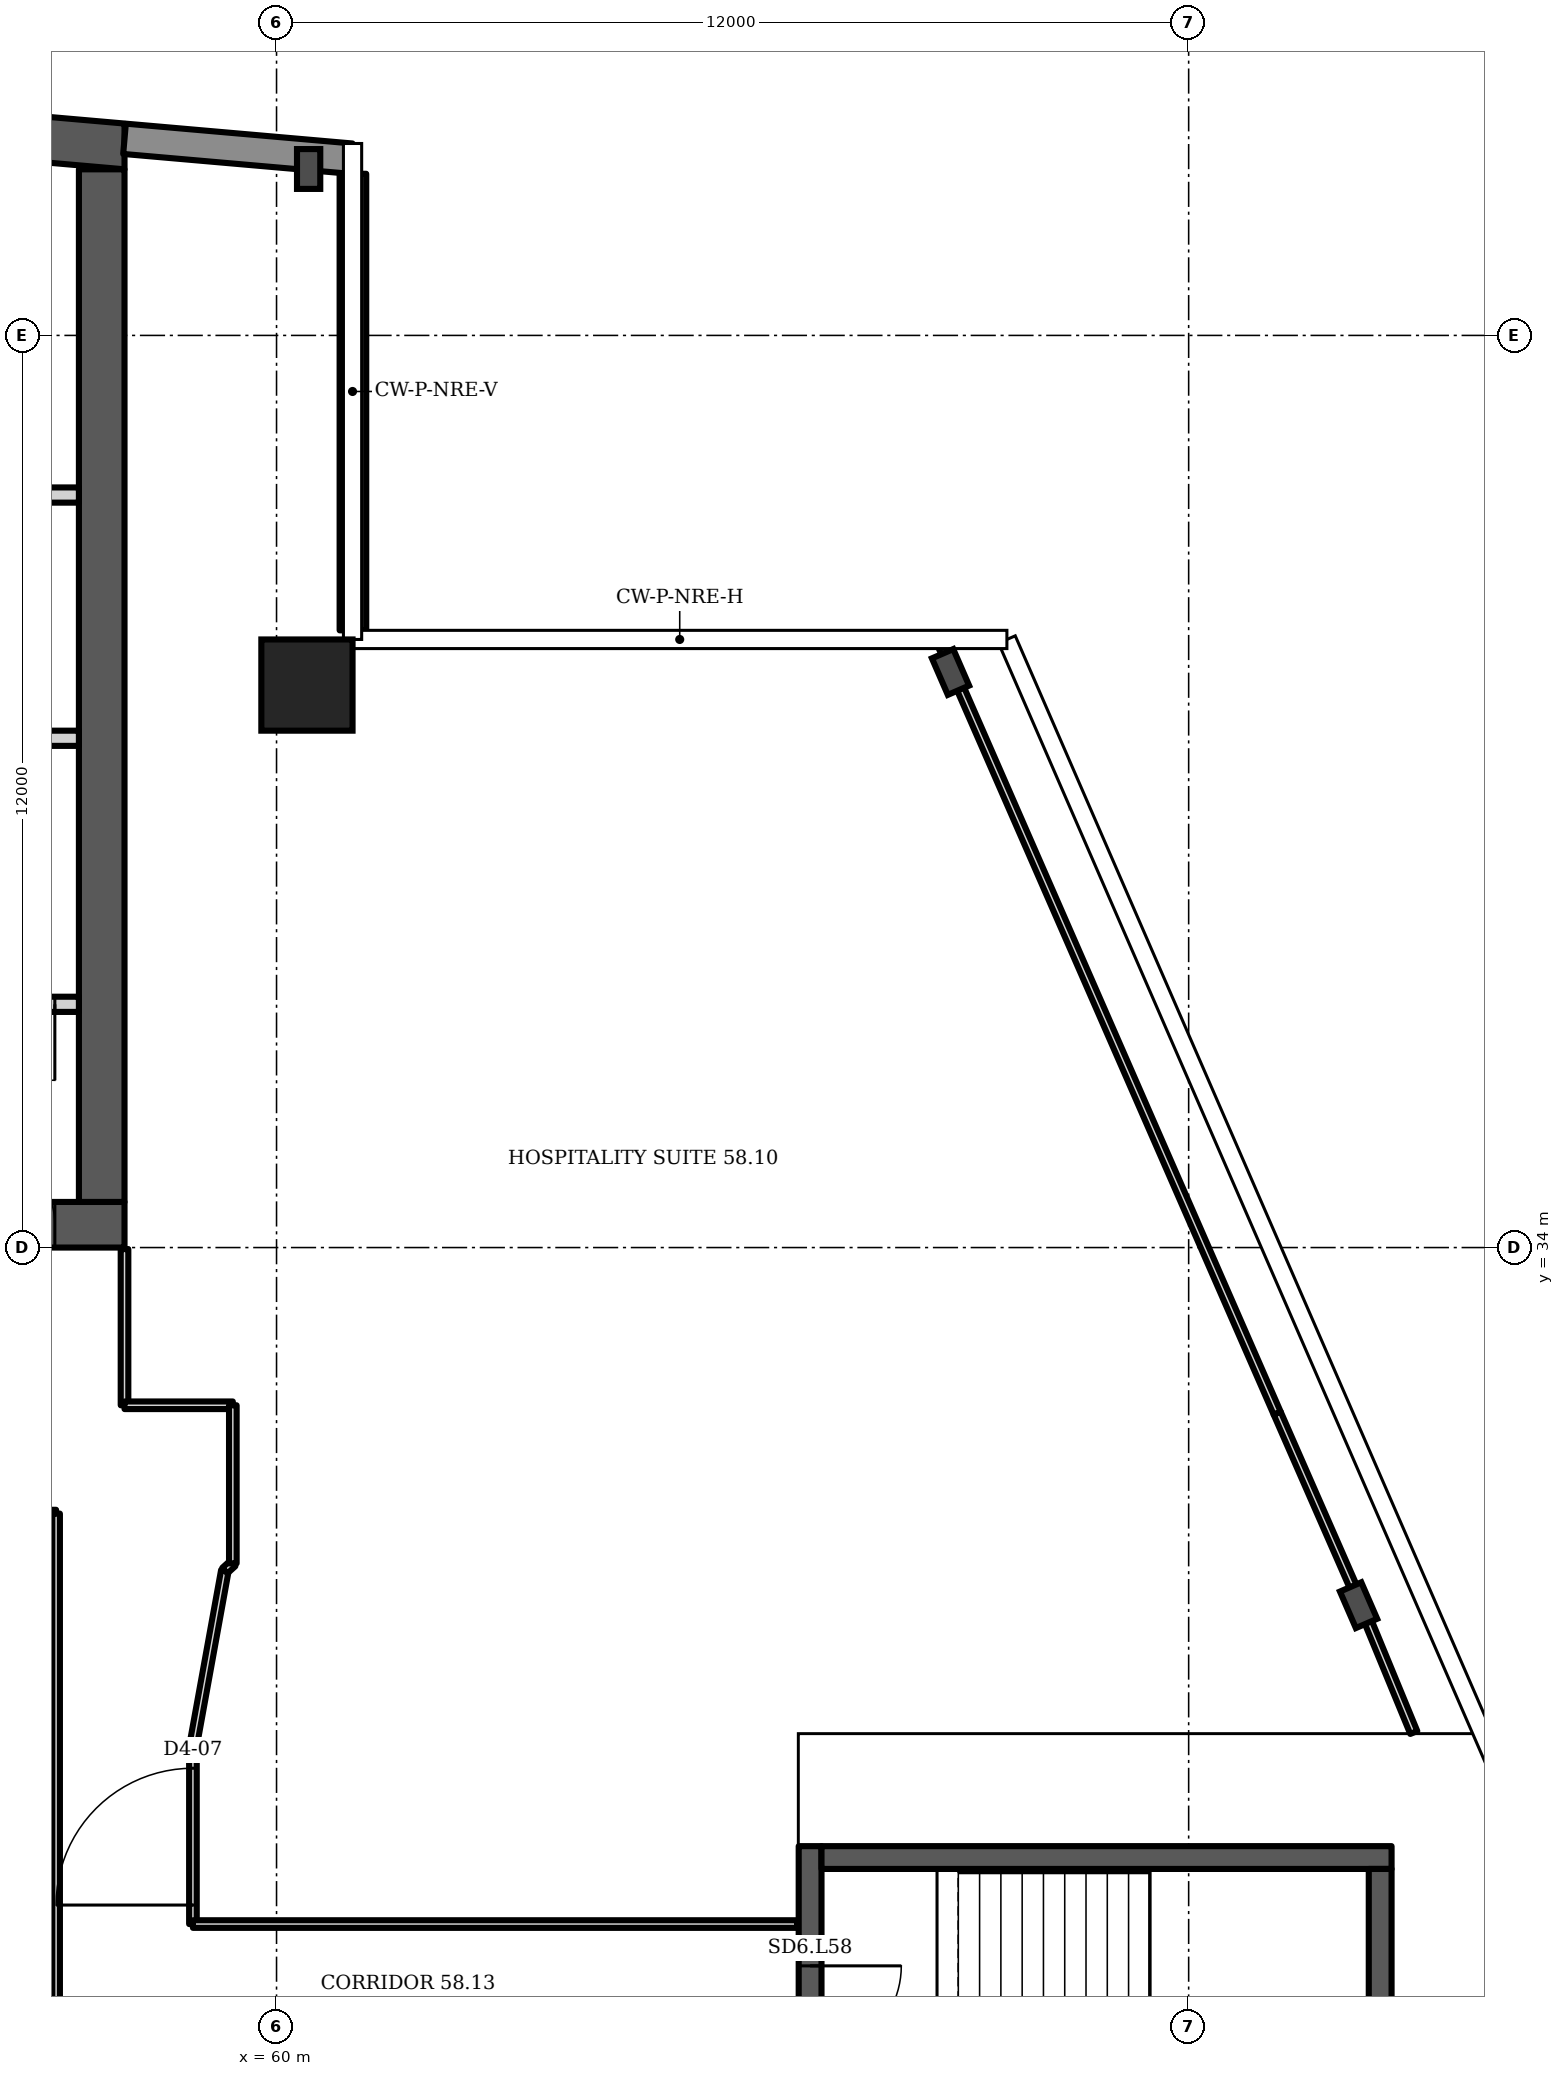
"""IFC4 building model, lengths in metres.
Left out: names, types, materials, properties, quantities, classifications, styles, units other than length and angle.
Written with IfcOpenShell. Run it as: python <this file> out.ifc"""

import sys

from ifc_helpers import new_model, si_unit, direction, frame, frame_2d, origin, origin_2d, place, context, subcontext, project, spatial, polyline, rectangle, i_section, outline, extrude, element, fill, save


model = new_model("IFC4")
c1 = context("Model", 3, precision=1e-05, world=origin(), true_north=direction((0.0, 1.0)))
c2 = subcontext(c1, "Body", "Model", "MODEL_VIEW")
j1 = project(units=[si_unit("LENGTHUNIT", "METRE"), si_unit("PLANEANGLEUNIT", "RADIAN")], contexts=[c1])
p1 = place(None, origin())
s1 = spatial("IfcSite", under=j1, at=p1, CompositionType="ELEMENT")
p2 = place(p1, origin())
s2 = spatial("IfcBuilding", under=s1, at=p2, CompositionType="ELEMENT")
p3 = place(p2, frame((0.0, 0.0, 232.3)))
s3 = spatial("IfcBuildingStorey", under=s2, at=p3, CompositionType="ELEMENT", Elevation=232.3)
p4 = place(p3, frame((0.0, 0.0, -0.0)))
e1 = element("IfcWall", 1, at=p4, inside=s3, PredefinedType="SHEAR", context=c2, shape_type="SweptSolid", body=[
    extrude(outline(polyline([(23.0, 48.185), (40.5, 49.716), (58.0, 48.185), (58.0, 48.787), (40.5, 50.318), (23.0, 48.787), (23.0, 48.185)])), origin(), (0.0, 0.0, 1.0), 3.6),
])
p5 = place(p3, frame((23.0, 34.3, 0.0), z_axis=(0.0, 0.0, 1.0), x_axis=(1.0, 0.0, 0.0)))
e2 = element("IfcWall", 2, at=p5, inside=s3, PredefinedType="SHEAR", context=c2, shape_type="SweptSolid", body=[
    extrude(rectangle(XDim=35.0, YDim=0.6, at=frame_2d((17.5, 0.0))), origin(), (0.0, 0.0, 1.0), 3.6),
])
p6 = place(p5, frame((0.65, 0.0, 0.0)))
e3 = element("IfcOpeningElement", 3, at=p6, cuts=e2, PredefinedType="OPENING", context=c2, shape_type="SweptSolid", body=[
    extrude(rectangle(XDim=1.2, YDim=2.1, at=frame_2d((0.6, 1.05))), frame((0.0, 0.31, 0.0), z_axis=(0.0, -1.0, 0.0), x_axis=(1.0, 0.0, 0.0)), (0.0, 0.0, 1.0), 0.62),
])
p7 = place(p5, frame((7.717, 0.0, 0.0)))
e4 = element("IfcOpeningElement", 4, at=p7, cuts=e2, PredefinedType="OPENING", context=c2, shape_type="SweptSolid", body=[
    extrude(rectangle(XDim=1.1, YDim=2.1, at=frame_2d((0.55, 1.05))), frame((0.0, 0.31, 0.0), z_axis=(0.0, -1.0, 0.0), x_axis=(1.0, 0.0, 0.0)), (0.0, 0.0, 1.0), 0.62),
])
p8 = place(p5, frame((12.183, 0.0, 0.0)))
e5 = element("IfcOpeningElement", 5, at=p8, cuts=e2, PredefinedType="OPENING", context=c2, shape_type="SweptSolid", body=[
    extrude(rectangle(XDim=1.1, YDim=2.1, at=frame_2d((0.55, 1.05))), frame((0.0, 0.31, 0.0), z_axis=(0.0, -1.0, 0.0), x_axis=(1.0, 0.0, 0.0)), (0.0, 0.0, 1.0), 0.62),
])
p9 = place(p5, frame((9.8, 0.0, 0.0)))
e6 = element("IfcOpeningElement", 6, at=p9, cuts=e2, PredefinedType="OPENING", context=c2, shape_type="SweptSolid", body=[
    extrude(rectangle(XDim=1.4, YDim=2.1, at=frame_2d((0.7, 1.05))), frame((0.0, 0.31, 0.0), z_axis=(0.0, -1.0, 0.0), x_axis=(1.0, 0.0, 0.0)), (0.0, 0.0, 1.0), 0.62),
])
p10 = place(p5, frame((14.717, 0.0, 0.0)))
e7 = element("IfcOpeningElement", 7, at=p10, cuts=e2, PredefinedType="OPENING", context=c2, shape_type="SweptSolid", body=[
    extrude(rectangle(XDim=1.1, YDim=2.1, at=frame_2d((0.55, 1.05))), frame((0.0, 0.31, 0.0), z_axis=(0.0, -1.0, 0.0), x_axis=(1.0, 0.0, 0.0)), (0.0, 0.0, 1.0), 0.62),
])
p11 = place(p5, frame((16.95, 0.0, 0.0)))
e8 = element("IfcOpeningElement", 8, at=p11, cuts=e2, PredefinedType="OPENING", context=c2, shape_type="SweptSolid", body=[
    extrude(rectangle(XDim=1.1, YDim=2.1, at=frame_2d((0.55, 1.05))), frame((0.0, 0.31, 0.0), z_axis=(0.0, -1.0, 0.0), x_axis=(1.0, 0.0, 0.0)), (0.0, 0.0, 1.0), 0.62),
])
p12 = place(p5, frame((19.183, 0.0, 0.0)))
e9 = element("IfcOpeningElement", 9, at=p12, cuts=e2, PredefinedType="OPENING", context=c2, shape_type="SweptSolid", body=[
    extrude(rectangle(XDim=1.1, YDim=2.1, at=frame_2d((0.55, 1.05))), frame((0.0, 0.31, 0.0), z_axis=(0.0, -1.0, 0.0), x_axis=(1.0, 0.0, 0.0)), (0.0, 0.0, 1.0), 0.62),
])
p13 = place(p5, frame((26.15, 0.0, 0.0)))
e10 = element("IfcOpeningElement", 10, at=p13, cuts=e2, PredefinedType="OPENING", context=c2, shape_type="SweptSolid", body=[
    extrude(rectangle(XDim=1.2, YDim=2.1, at=frame_2d((0.6, 1.05))), frame((0.0, 0.31, 0.0), z_axis=(0.0, -1.0, 0.0), x_axis=(1.0, 0.0, 0.0)), (0.0, 0.0, 1.0), 0.62),
])
p14 = place(p5, frame((28.767, 0.0, 0.0)))
e11 = element("IfcOpeningElement", 11, at=p14, cuts=e2, PredefinedType="OPENING", context=c2, shape_type="SweptSolid", body=[
    extrude(rectangle(XDim=1.0, YDim=2.1, at=frame_2d((0.5, 1.05))), frame((0.0, 0.31, 0.0), z_axis=(0.0, -1.0, 0.0), x_axis=(1.0, 0.0, 0.0)), (0.0, 0.0, 1.0), 0.62),
])
p15 = place(p5, frame((33.083, 0.0, 0.0)))
e12 = element("IfcOpeningElement", 12, at=p15, cuts=e2, PredefinedType="OPENING", context=c2, shape_type="SweptSolid", body=[
    extrude(rectangle(XDim=1.0, YDim=2.1, at=frame_2d((0.5, 1.05))), frame((0.0, 0.31, 0.0), z_axis=(0.0, -1.0, 0.0), x_axis=(1.0, 0.0, 0.0)), (0.0, 0.0, 1.0), 0.62),
])
p16 = place(p5, frame((30.8, 0.0, 0.0)))
e13 = element("IfcOpeningElement", 13, at=p16, cuts=e2, PredefinedType="OPENING", context=c2, shape_type="SweptSolid", body=[
    extrude(rectangle(XDim=1.4, YDim=2.1, at=frame_2d((0.7, 1.05))), frame((0.0, 0.31, 0.0), z_axis=(0.0, -1.0, 0.0), x_axis=(1.0, 0.0, 0.0)), (0.0, 0.0, 1.0), 0.62),
])
p17 = place(p3, frame((57.7, 34.6, 0.0), z_axis=(0.0, 0.0, 1.0), x_axis=(0.0, 1.0, 0.0)))
e14 = element("IfcWall", 14, at=p17, inside=s3, PredefinedType="SHEAR", context=c2, shape_type="SweptSolid", body=[
    extrude(rectangle(XDim=13.585, YDim=0.6, at=frame_2d((6.792, 0.0))), origin(), (0.0, 0.0, 1.0), 3.6),
])
p18 = place(p3, frame((60.4, 41.4, 0.0), z_axis=(0.0, 0.0, 1.0), x_axis=(1.0, 0.0, 0.0)))
e15 = element("IfcColumn", 15, at=p18, inside=s3, PredefinedType="COLUMN", context=c2, shape_type="SweptSolid", body=[
    extrude(rectangle(XDim=1.2, YDim=1.2, at=origin_2d()), origin(), (0.0, 0.0, 1.0), 3.6),
])
for number, where, z_axis, x_axis in (
    (16, (74.235, 29.295, 0.0), (0.0, 0.0, 1.0), (0.917, 0.399, 0.0)),
    (17, (68.867, 41.572, 0.0), (0.0, 0.0, 1.0), (0.917, 0.399, 0.0)),
    (18, (60.422, 48.189, 0.0), (0.0, 0.0, 1.0), (1.0, 0.0, 0.0)),
):
    element("IfcColumn", number, at=place(p3, frame(where, z_axis=z_axis, x_axis=x_axis)), inside=s3, PredefinedType="COLUMN", context=c2, shape_type="SweptSolid", body=[
        extrude(i_section(OverallWidth=0.306, OverallDepth=0.524, WebThickness=0.021, FlangeThickness=0.04, FilletRadius=0.027, at=origin_2d()), origin(), (0.0, 0.0, 1.0), 3.6),
    ])
p19 = place(p3, frame((60.983, 48.326, 0.0), z_axis=(0.0, 0.0, 1.0), x_axis=(-0.996194, 0.087168, 0.0)))
e19 = element("IfcWall", 19, at=p19, inside=s3, PredefinedType="SOLIDWALL", context=c2, shape_type="SweptSolid", body=[
    extrude(rectangle(XDim=2.994, YDim=0.4, at=frame_2d((1.497, 0.0))), origin(), (0.0, 0.0, 1.0), 3.2),
])
p20 = place(p3, frame((61.005, 42.12, 0.0), z_axis=(0.0, 0.0, 1.0), x_axis=(0.0, 1.0, 0.0)))
e20 = element("IfcWall", 20, at=p20, inside=s3, PredefinedType="SOLIDWALL", context=c2, shape_type="SweptSolid", body=[
    extrude(rectangle(XDim=6.006, YDim=0.35, at=frame_2d((3.003, 0.0))), origin(), (0.0, 0.0, 1.0), 1.0),
])
p21 = place(p3, frame((55.767, 37.2, 0.0), z_axis=(0.0, 0.0, 1.0), x_axis=(1.0, 0.0, 0.0)))
e21 = element("IfcWall", 21, at=p21, inside=s3, PredefinedType="PARTITIONING", context=c2, shape_type="SweptSolid", body=[
    extrude(rectangle(XDim=1.633, YDim=0.2, at=frame_2d((0.817, 0.0))), origin(), (0.0, 0.0, 1.0), 3.2),
])
p22 = place(p21, frame((0.317, 0.0, 0.0)))
e22 = element("IfcOpeningElement", 22, at=p22, cuts=e21, PredefinedType="OPENING", context=c2, shape_type="SweptSolid", body=[
    extrude(rectangle(XDim=1.0, YDim=2.1, at=frame_2d((0.5, 1.05))), frame((0.0, 0.11, 0.0), z_axis=(0.0, -1.0, 0.0), x_axis=(1.0, 0.0, 0.0)), (0.0, 0.0, 1.0), 0.22),
])
p23 = place(p3, frame((51.3, 40.7, 0.0), z_axis=(0.0, 0.0, 1.0), x_axis=(1.0, 0.0, 0.0)))
e23 = element("IfcWall", 23, at=p23, inside=s3, PredefinedType="PARTITIONING", context=c2, shape_type="SweptSolid", body=[
    extrude(rectangle(XDim=6.1, YDim=0.2, at=frame_2d((3.05, 0.0))), origin(), (0.0, 0.0, 1.0), 3.2),
])
p24 = place(p23, frame((0.417, 0.0, 0.0)))
e24 = element("IfcOpeningElement", 24, at=p24, cuts=e23, PredefinedType="OPENING", context=c2, shape_type="SweptSolid", body=[
    extrude(rectangle(XDim=1.1, YDim=2.1, at=frame_2d((0.55, 1.05))), frame((0.0, 0.11, 0.0), z_axis=(0.0, -1.0, 0.0), x_axis=(1.0, 0.0, 0.0)), (0.0, 0.0, 1.0), 0.22),
])
p25 = place(p23, frame((3.617, 0.0, 0.0)))
e25 = element("IfcOpeningElement", 25, at=p25, cuts=e23, PredefinedType="OPENING", context=c2, shape_type="SweptSolid", body=[
    extrude(rectangle(XDim=1.0, YDim=2.1, at=frame_2d((0.5, 1.05))), frame((0.0, 0.11, 0.0), z_axis=(0.0, -1.0, 0.0), x_axis=(1.0, 0.0, 0.0)), (0.0, 0.0, 1.0), 0.22),
])
p26 = place(p3, frame((51.3, 43.9, 0.0), z_axis=(0.0, 0.0, 1.0), x_axis=(1.0, 0.0, 0.0)))
e26 = element("IfcWall", 26, at=p26, inside=s3, PredefinedType="PARTITIONING", context=c2, shape_type="SweptSolid", body=[
    extrude(rectangle(XDim=6.1, YDim=0.2, at=frame_2d((3.05, 0.0))), origin(), (0.0, 0.0, 1.0), 3.2),
])
p27 = place(p26, frame((3.617, 0.0, 0.0)))
e27 = element("IfcOpeningElement", 27, at=p27, cuts=e26, PredefinedType="OPENING", context=c2, shape_type="SweptSolid", body=[
    extrude(rectangle(XDim=1.0, YDim=2.1, at=frame_2d((0.5, 1.05))), frame((0.0, 0.11, 0.0), z_axis=(0.0, -1.0, 0.0), x_axis=(1.0, 0.0, 0.0)), (0.0, 0.0, 1.0), 0.22),
])
p28 = place(p3, frame((67.02, 21.775, 0.0), z_axis=(0.0, 0.0, 1.0), x_axis=(0.0, 1.0, 0.0)))
e28 = element("IfcWall", 28, at=p28, inside=s3, PredefinedType="SHEAR", context=c2, shape_type="SweptSolid", body=[
    extrude(rectangle(XDim=4.35, YDim=0.3, at=frame_2d((2.175, 0.0))), origin(), (0.0, 0.0, 1.0), 3.2),
])
p29 = place(p28, frame((1.575, 0.0, 0.0)))
e29 = element("IfcOpeningElement", 29, at=p29, cuts=e28, PredefinedType="OPENING", context=c2, shape_type="SweptSolid", body=[
    extrude(rectangle(XDim=1.2, YDim=2.1, at=frame_2d((0.6, 1.05))), frame((0.0, 0.16, 0.0), z_axis=(0.0, -1.0, 0.0), x_axis=(1.0, 0.0, 0.0)), (0.0, 0.0, 1.0), 0.32),
])
p30 = place(p3, frame((44.15, 30.5, 0.0), z_axis=(0.0, 0.0, 1.0), x_axis=(1.0, 0.0, 0.0)))
e30 = element("IfcWall", 30, at=p30, inside=s3, PredefinedType="PARTITIONING", context=c2, shape_type="SweptSolid", body=[
    extrude(rectangle(XDim=12.95, YDim=0.1, at=frame_2d((6.475, 0.0))), origin(), (0.0, 0.0, 1.0), 3.2),
])
p31 = place(p30, frame((5.17, 0.0, 0.0)))
e31 = element("IfcOpeningElement", 31, at=p31, cuts=e30, PredefinedType="OPENING", context=c2, shape_type="SweptSolid", body=[
    extrude(rectangle(XDim=1.0, YDim=2.1, at=frame_2d((0.5, 1.05))), frame((0.0, 0.06, 0.0), z_axis=(0.0, -1.0, 0.0), x_axis=(1.0, 0.0, 0.0)), (0.0, 0.0, 1.0), 0.12),
])
p32 = place(p3, frame((57.1, 14.345, 0.0), z_axis=(0.0, 0.0, 1.0), x_axis=(0.0, 1.0, 0.0)))
e32 = element("IfcWall", 32, at=p32, inside=s3, PredefinedType="PARTITIONING", context=c2, shape_type="SweptSolid", body=[
    extrude(rectangle(XDim=16.155, YDim=0.1, at=frame_2d((8.078, 0.0))), origin(), (0.0, 0.0, 1.0), 3.2),
])
p33 = place(p32, frame((5.215, 0.0, 0.0)))
e33 = element("IfcOpeningElement", 33, at=p33, cuts=e32, PredefinedType="OPENING", context=c2, shape_type="SweptSolid", body=[
    extrude(rectangle(XDim=1.0, YDim=2.1, at=frame_2d((0.5, 1.05))), frame((0.0, 0.06, 0.0), z_axis=(0.0, -1.0, 0.0), x_axis=(1.0, 0.0, 0.0)), (0.0, 0.0, 1.0), 0.12),
])
p34 = place(p3, frame((58.0, 31.925, 0.0), z_axis=(0.0, 0.0, 1.0), x_axis=(0.0, 1.0, 0.0)))
e34 = element("IfcWall", 34, at=p34, inside=s3, PredefinedType="PARTITIONING", context=c2, shape_type="SweptSolid", body=[
    extrude(rectangle(XDim=2.055, YDim=0.1, at=frame_2d((1.027, 0.0))), origin(), (0.0, 0.0, 1.0), 3.2),
])
p35 = place(p3, frame((58.0, 31.925, 0.0), z_axis=(0.0, 0.0, 1.0), x_axis=(1.0, 0.0, 0.0)))
e35 = element("IfcWall", 35, at=p35, inside=s3, PredefinedType="PARTITIONING", context=c2, shape_type="SweptSolid", body=[
    extrude(rectangle(XDim=1.425, YDim=0.1, at=frame_2d((0.712, 0.0))), origin(), (0.0, 0.0, 1.0), 3.2),
])
p36 = place(p3, frame((58.9, 25.1, 0.0), z_axis=(0.0, 0.0, 1.0), x_axis=(0.0, 1.0, 0.0)))
e36 = element("IfcWall", 36, at=p36, inside=s3, PredefinedType="PARTITIONING", context=c2, shape_type="SweptSolid", body=[
    extrude(rectangle(XDim=2.335, YDim=0.1, at=frame_2d((1.167, 0.0))), origin(), (0.0, 0.0, 1.0), 3.2),
])
p37 = place(p36, frame((0.25, 0.0, 0.0)))
e37 = element("IfcOpeningElement", 37, at=p37, cuts=e36, PredefinedType="OPENING", context=c2, shape_type="SweptSolid", body=[
    extrude(rectangle(XDim=1.8, YDim=2.1, at=frame_2d((0.9, 1.05))), frame((0.0, 0.06, 0.0), z_axis=(0.0, -1.0, 0.0), x_axis=(1.0, 0.0, 0.0)), (0.0, 0.0, 1.0), 0.12),
])
p38 = place(p3, frame((58.9, 25.1, 0.0), z_axis=(0.0, 0.0, 1.0), x_axis=(1.0, 0.0, 0.0)))
e38 = element("IfcWall", 38, at=p38, inside=s3, PredefinedType="PARTITIONING", context=c2, shape_type="SweptSolid", body=[
    extrude(rectangle(XDim=7.95, YDim=0.1, at=frame_2d((3.975, 0.0))), origin(), (0.0, 0.0, 1.0), 3.2),
])
p39 = place(p3, frame((58.9, 27.435, 0.0), z_axis=(0.0, 0.0, 1.0), x_axis=(0.178584, 0.983924, 0.0)))
e39 = element("IfcWall", 39, at=p39, inside=s3, PredefinedType="PARTITIONING", context=c2, shape_type="SweptSolid", body=[
    extrude(rectangle(XDim=2.353, YDim=0.1, at=frame_2d((1.176, 0.0))), origin(), (0.0, 0.0, 1.0), 3.2),
])
p40 = place(p3, frame((59.32, 29.75, 0.0), z_axis=(0.0, 0.0, 1.0), x_axis=(0.741581, 0.670872, 0.0)))
e40 = element("IfcWall", 40, at=p40, inside=s3, PredefinedType="PARTITIONING", context=c2, shape_type="SweptSolid", body=[
    extrude(rectangle(XDim=0.142, YDim=0.1, at=frame_2d((0.071, 0.0))), origin(), (0.0, 0.0, 1.0), 3.2),
])
p41 = place(p3, frame((59.425, 29.845, 0.0), z_axis=(0.0, 0.0, 1.0), x_axis=(0.0, 1.0, 0.0)))
e41 = element("IfcWall", 41, at=p41, inside=s3, PredefinedType="PARTITIONING", context=c2, shape_type="SweptSolid", body=[
    extrude(rectangle(XDim=2.08, YDim=0.1, at=frame_2d((1.04, 0.0))), origin(), (0.0, 0.0, 1.0), 3.2),
])
p42 = place(p3, frame((73.165, 31.82, 0.0), z_axis=(0.0, 0.0, 1.0), x_axis=(-0.400551, 0.916278, 0.0)))
e42 = element("IfcWall", 42, at=p42, inside=s3, PredefinedType="PARTITIONING", context=c2, shape_type="SweptSolid", body=[
    extrude(rectangle(XDim=11.088, YDim=0.1, at=frame_2d((5.544, 0.0))), origin(), (0.0, 0.0, 1.0), 2.58),
])
p43 = place(p3, frame((74.265, 29.31, 0.0), z_axis=(0.0, 0.0, 1.0), x_axis=(-0.401346, 0.915924, 0.0)))
e43 = element("IfcWall", 43, at=p43, inside=s3, PredefinedType="PARTITIONING", context=c2, shape_type="SweptSolid", body=[
    extrude(rectangle(XDim=2.74, YDim=0.1, at=frame_2d((1.37, 0.0))), origin(), (0.0, 0.0, 1.0), 2.58),
])
p44 = place(p3, frame((74.962, 27.62, 0.0), z_axis=(0.0, 0.0, 1.0), x_axis=(-0.381293, 0.924452, 0.0)))
e44 = element("IfcWall", 44, at=p44, inside=s3, PredefinedType="PARTITIONING", context=c2, shape_type="SweptSolid", body=[
    extrude(rectangle(XDim=1.828, YDim=0.1, at=frame_2d((0.914, 0.0))), origin(), (0.0, 0.0, 1.0), 2.58),
])
p45 = place(p3, frame((67.17, 25.975, 0.0), z_axis=(0.0, 0.0, 1.0), x_axis=(1.0, 0.0, 0.0)))
e45 = element("IfcWall", 45, at=p45, inside=s3, PredefinedType="SHEAR", context=c2, shape_type="SweptSolid", body=[
    extrude(rectangle(XDim=7.5, YDim=0.3, at=frame_2d((3.75, 0.0))), origin(), (0.0, 0.0, 1.0), 3.2),
])
p46 = place(p3, frame((74.52, 22.075, 0.0), z_axis=(0.0, 0.0, 1.0), x_axis=(0.0, 1.0, 0.0)))
e46 = element("IfcWall", 46, at=p46, inside=s3, PredefinedType="SHEAR", context=c2, shape_type="SweptSolid", body=[
    extrude(rectangle(XDim=3.75, YDim=0.3, at=frame_2d((1.875, 0.0))), origin(), (0.0, 0.0, 1.0), 3.2),
])
p47 = place(p15, origin())
e47 = element("IfcDoor", 47, at=p47, inside=s3, OperationType="SINGLE_SWING_LEFT", PredefinedType="DOOR", context=c2, shape_type="SweptSolid", body=[
    extrude(rectangle(XDim=1.0, YDim=2.1, at=frame_2d((0.5, 1.05))), frame((0.0, 0.025, 0.0), z_axis=(0.0, -1.0, 0.0), x_axis=(1.0, 0.0, 0.0)), (0.0, 0.0, 1.0), 0.05),
])
fill(e12, e47)
p48 = place(p22, origin())
e48 = element("IfcDoor", 48, at=p48, inside=s3, OperationType="SINGLE_SWING_RIGHT", PredefinedType="DOOR", context=c2, shape_type="SweptSolid", body=[
    extrude(rectangle(XDim=1.0, YDim=2.1, at=frame_2d((0.5, 1.05))), frame((0.0, 0.025, 0.0), z_axis=(0.0, -1.0, 0.0), x_axis=(1.0, 0.0, 0.0)), (0.0, 0.0, 1.0), 0.05),
])
fill(e22, e48)
p49 = place(p29, origin())
e49 = element("IfcDoor", 49, at=p49, inside=s3, OperationType="SINGLE_SWING_RIGHT", PredefinedType="DOOR", context=c2, shape_type="SweptSolid", body=[
    extrude(rectangle(XDim=1.2, YDim=2.1, at=frame_2d((0.6, 1.05))), frame((0.0, 0.025, 0.0), z_axis=(0.0, -1.0, 0.0), x_axis=(1.0, 0.0, 0.0)), (0.0, 0.0, 1.0), 0.05),
])
fill(e29, e49)
p50 = place(p37, origin())
e50 = element("IfcDoor", 50, at=p50, inside=s3, OperationType="DOUBLE_DOOR_SINGLE_SWING", PredefinedType="DOOR", context=c2, shape_type="SweptSolid", body=[
    extrude(rectangle(XDim=1.8, YDim=2.1, at=frame_2d((0.9, 1.05))), frame((0.0, 0.025, 0.0), z_axis=(0.0, -1.0, 0.0), x_axis=(1.0, 0.0, 0.0)), (0.0, 0.0, 1.0), 0.05),
])
fill(e37, e50)
save(model, sys.argv[1])
